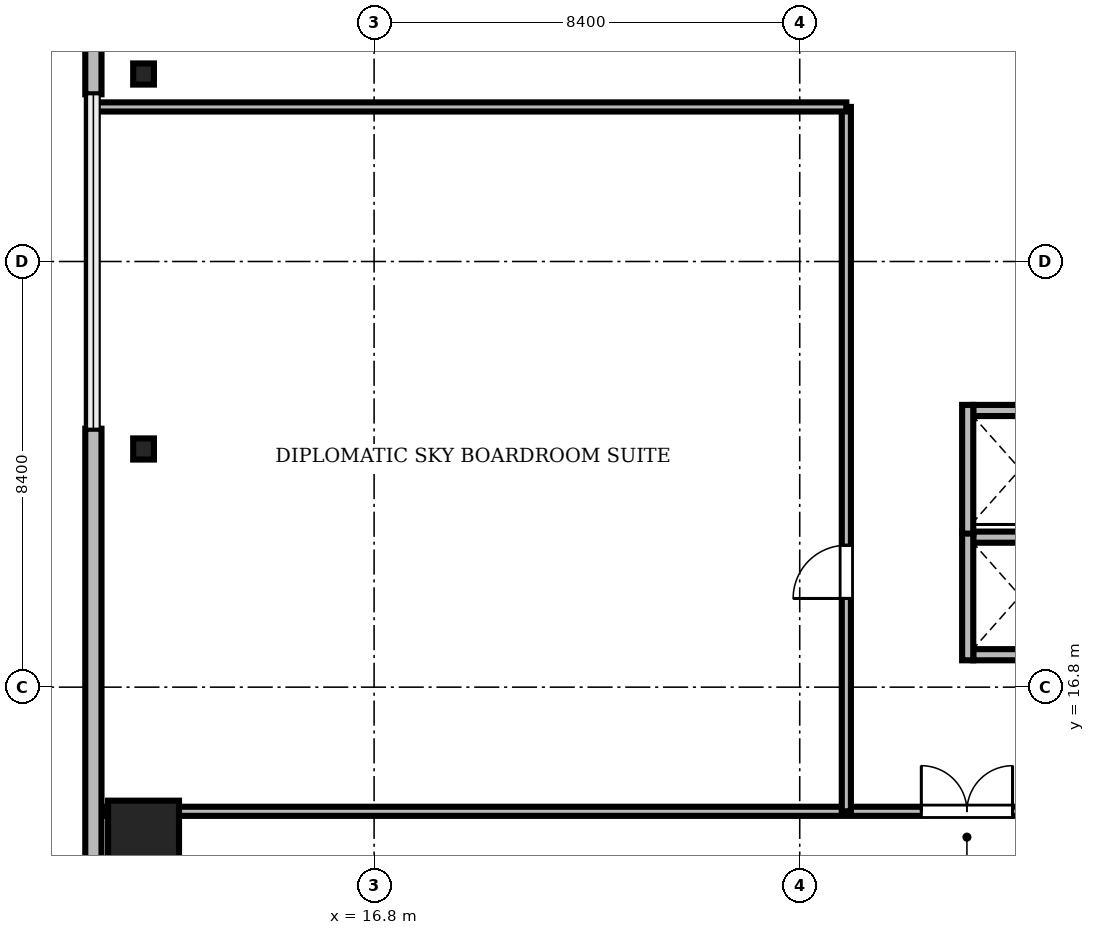
"""IFC4 building model, lengths in metres.
Left out: names, types, materials, properties, quantities, classifications, styles, units other than length and angle.
Written with IfcOpenShell. Run it as: python <this file> out.ifc"""

import sys

from ifc_helpers import new_model, si_unit, direction, frame, frame_2d, origin, origin_2d, place, context, subcontext, project, spatial, rectangle, i_section, extrude, source, transform, mapped, element, fill, save


model = new_model("IFC4")
c1 = context("Model", 3, precision=1e-05, world=origin(), true_north=direction((0.0, 1.0)))
c2 = subcontext(c1, "Body", "Model", "MODEL_VIEW")
j1 = project(units=[si_unit("LENGTHUNIT", "METRE"), si_unit("PLANEANGLEUNIT", "RADIAN")], contexts=[c1])
p1 = place(None, origin())
s1 = spatial("IfcSite", under=j1, at=p1, CompositionType="ELEMENT")
p2 = place(p1, origin())
s2 = spatial("IfcBuilding", under=s1, at=p2, CompositionType="ELEMENT")
p3 = place(p2, frame((0.0, 0.0, 172.2)))
s3 = spatial("IfcBuildingStorey", under=s2, at=p3, CompositionType="ELEMENT", Elevation=172.2)
m1 = source(origin(), c2, "Body", "SweptSolid", [
    extrude(rectangle(XDim=1.4, YDim=1.4, at=origin_2d()), origin(), (0.0, 0.0, 1.0), 4.78),
])
p4 = place(p3, frame((12.25, 13.86, 0.0), z_axis=(0.0, 0.0, 1.0), x_axis=(1.0, 0.0, 0.0)))
e1 = element("IfcColumn", 1, at=p4, inside=s3, PredefinedType="COLUMN", context=c2, shape_type="MappedRepresentation", body=[
    mapped(m1, transform((0.0, 0.0, 0.0), scale=1.0)),
])
m2 = source(origin(), c2, "Body", "SweptSolid", [
    extrude(i_section(OverallWidth=0.409, OverallDepth=0.417, WebThickness=0.021, FlangeThickness=0.033, FilletRadius=0.015, at=origin_2d()), origin(), (0.0, 0.0, 1.0), 4.78),
])
for number, where, z_axis, x_axis in (
    (2, (12.25, 28.9, 0.0), (0.0, 0.0, 1.0), (1.0, 0.0, 0.0)),
    (3, (12.25, 21.5, 0.0), (0.0, 0.0, 1.0), (1.0, 0.0, 0.0)),
):
    element("IfcColumn", number, at=place(p3, frame(where, z_axis=z_axis, x_axis=x_axis)), inside=s3, PredefinedType="COLUMN", context=c2, shape_type="MappedRepresentation", body=[
        mapped(m2, transform((0.0, 0.0, 0.0), scale=1.0)),
    ])
m3 = source(origin(), c2, "Body", "SweptSolid", [
    extrude(rectangle(XDim=15.6, YDim=0.32, at=frame_2d((7.8, 0.0))), origin(), (0.0, 0.0, 1.0), 4.78),
])
p5 = place(p3, frame((11.26, 44.1, 0.0), z_axis=(0.0, 0.0, 1.0), x_axis=(0.0, -1.0, 0.0)))
e4 = element("IfcWall", 4, at=p5, inside=s3, PredefinedType="SOLIDWALL", context=c2, shape_type="MappedRepresentation", body=[
    mapped(m3, transform((0.0, 0.0, 0.0), scale=1.0)),
])
m4 = source(origin(), c2, "Body", "SweptSolid", [
    extrude(rectangle(XDim=1.4, YDim=2.3, at=frame_2d((0.7, 1.15))), frame((0.0, 0.17, 0.0), z_axis=(0.0, -1.0, 0.0), x_axis=(1.0, 0.0, 0.0)), (0.0, 0.0, 1.0), 0.34),
])
p6 = place(p5, frame((9.61, 0.0, 0.0)))
e5 = element("IfcOpeningElement", 5, at=p6, cuts=e4, PredefinedType="OPENING", context=c2, shape_type="MappedRepresentation", body=[
    mapped(m4, transform((0.0, 0.0, 0.0), scale=1.0)),
])
m5 = source(origin(), c2, "Body", "SweptSolid", [
    extrude(rectangle(XDim=2.8, YDim=2.4, at=frame_2d((1.4, 1.2))), frame((0.0, 0.17, 0.0), z_axis=(0.0, -1.0, 0.0), x_axis=(1.0, 0.0, 0.0)), (0.0, 0.0, 1.0), 0.34),
])
p7 = place(p5, frame((2.705, 0.0, 0.72)))
e6 = element("IfcOpeningElement", 6, at=p7, cuts=e4, PredefinedType="OPENING", context=c2, shape_type="MappedRepresentation", body=[
    mapped(m5, transform((0.0, 0.0, 0.0), scale=1.0)),
])
m6 = source(origin(), c2, "Body", "SweptSolid", [
    extrude(rectangle(XDim=15.6, YDim=0.32, at=frame_2d((7.8, 0.0))), origin(), (0.0, 0.0, 1.0), 4.78),
])
p8 = place(p3, frame((11.26, 21.9, 0.0), z_axis=(0.0, 0.0, 1.0), x_axis=(0.0, -1.0, 0.0)))
e7 = element("IfcWall", 7, at=p8, inside=s3, PredefinedType="SOLIDWALL", context=c2, shape_type="MappedRepresentation", body=[
    mapped(m6, transform((0.0, 0.0, 0.0), scale=1.0)),
])
p9 = place(p8, frame((10.095, 0.0, 0.72)))
e8 = element("IfcOpeningElement", 8, at=p9, cuts=e7, PredefinedType="OPENING", context=c2, shape_type="MappedRepresentation", body=[
    mapped(m5, transform((0.0, 0.0, 0.0), scale=1.0)),
])
m7 = source(origin(), c2, "Body", "SweptSolid", [
    extrude(rectangle(XDim=1.85, YDim=0.22, at=frame_2d((0.925, 0.0))), origin(), (0.0, 0.0, 1.0), 4.222),
])
p10 = place(p3, frame((28.625, 17.44, 0.0), z_axis=(0.0, 0.0, 1.0), x_axis=(1.0, 0.0, 0.0)))
e9 = element("IfcWall", 9, at=p10, inside=s3, PredefinedType="SOLIDWALL", context=c2, shape_type="MappedRepresentation", body=[
    mapped(m7, transform((0.0, 0.0, 0.0), scale=1.0)),
])
m8 = source(origin(), c2, "Body", "SweptSolid", [
    extrude(rectangle(XDim=1.85, YDim=0.22, at=frame_2d((0.925, 0.0))), origin(), (0.0, 0.0, 1.0), 4.78),
])
p11 = place(p3, frame((28.625, 19.76, 0.0), z_axis=(0.0, 0.0, 1.0), x_axis=(1.0, 0.0, 0.0)))
e10 = element("IfcWall", 10, at=p11, inside=s3, PredefinedType="SOLIDWALL", context=c2, shape_type="MappedRepresentation", body=[
    mapped(m8, transform((0.0, 0.0, 0.0), scale=1.0)),
])
m9 = source(origin(), c2, "Body", "SweptSolid", [
    extrude(rectangle(XDim=2.54, YDim=0.22, at=frame_2d((1.27, 0.0))), origin(), (0.0, 0.0, 1.0), 4.222),
])
p12 = place(p3, frame((28.515, 17.33, 0.0), z_axis=(0.0, 0.0, 1.0), x_axis=(0.0, 1.0, 0.0)))
e11 = element("IfcWall", 11, at=p12, inside=s3, PredefinedType="SOLIDWALL", context=c2, shape_type="MappedRepresentation", body=[
    mapped(m9, transform((0.0, 0.0, 0.0), scale=1.0)),
])
p13 = place(p3, frame((28.625, 22.26, 0.0), z_axis=(0.0, 0.0, 1.0), x_axis=(1.0, 0.0, 0.0)))
e12 = element("IfcWall", 12, at=p13, inside=s3, PredefinedType="SOLIDWALL", context=c2, shape_type="MappedRepresentation", body=[
    mapped(m8, transform((0.0, 0.0, 0.0), scale=1.0)),
])
m10 = source(origin(), c2, "Body", "SweptSolid", [
    extrude(rectangle(XDim=2.54, YDim=0.22, at=frame_2d((1.27, 0.0))), origin(), (0.0, 0.0, 1.0), 4.78),
])
p14 = place(p3, frame((28.515, 19.83, 0.0), z_axis=(0.0, 0.0, 1.0), x_axis=(0.0, 1.0, 0.0)))
e13 = element("IfcWall", 13, at=p14, inside=s3, PredefinedType="SOLIDWALL", context=c2, shape_type="MappedRepresentation", body=[
    mapped(m10, transform((0.0, 0.0, 0.0), scale=1.0)),
])
m11 = source(origin(), c2, "Body", "SweptSolid", [
    extrude(rectangle(XDim=46.1, YDim=0.18, at=frame_2d((23.05, 0.0))), origin(), (0.0, 0.0, 1.0), 4.022),
])
p15 = place(p3, frame((11.45, 14.35, 0.0), z_axis=(0.0, 0.0, 1.0), x_axis=(1.0, 0.0, 0.0)))
e14 = element("IfcWall", 14, at=p15, inside=s3, PredefinedType="PARTITIONING", context=c2, shape_type="MappedRepresentation", body=[
    mapped(m11, transform((0.0, 0.0, 0.0), scale=1.0)),
])
m12 = source(origin(), c2, "Body", "SweptSolid", [
    extrude(rectangle(XDim=1.8, YDim=2.4, at=frame_2d((0.9, 1.2))), frame((0.0, 0.1, 0.0), z_axis=(0.0, -1.0, 0.0), x_axis=(1.0, 0.0, 0.0)), (0.0, 0.0, 1.0), 0.2),
])
p16 = place(p15, frame((16.15, 0.0, 0.0)))
e15 = element("IfcOpeningElement", 15, at=p16, cuts=e14, PredefinedType="OPENING", context=c2, shape_type="MappedRepresentation", body=[
    mapped(m12, transform((0.0, 0.0, 0.0), scale=1.0)),
])
p17 = place(p15, frame((30.75, 0.0, 0.0)))
e16 = element("IfcOpeningElement", 16, at=p17, cuts=e14, PredefinedType="OPENING", context=c2, shape_type="MappedRepresentation", body=[
    mapped(m12, transform((0.0, 0.0, 0.0), scale=1.0)),
])
m13 = source(origin(), c2, "Body", "SweptSolid", [
    extrude(rectangle(XDim=13.9, YDim=0.18, at=frame_2d((6.95, 0.0))), origin(), (0.0, 0.0, 1.0), 4.222),
])
p18 = place(p3, frame((26.12, 14.35, 0.0), z_axis=(0.0, 0.0, 1.0), x_axis=(0.0, 1.0, 0.0)))
e17 = element("IfcWall", 17, at=p18, inside=s3, PredefinedType="PARTITIONING", context=c2, shape_type="MappedRepresentation", body=[
    mapped(m13, transform((0.0, 0.0, 0.0), scale=1.0)),
])
m14 = source(origin(), c2, "Body", "SweptSolid", [
    extrude(rectangle(XDim=1.05, YDim=2.2, at=frame_2d((0.525, 1.1))), frame((0.0, 0.1, 0.0), z_axis=(0.0, -1.0, 0.0), x_axis=(1.0, 0.0, 0.0)), (0.0, 0.0, 1.0), 0.2),
])
p19 = place(p18, frame((4.2, 0.0, 0.0)))
e18 = element("IfcOpeningElement", 18, at=p19, cuts=e17, PredefinedType="OPENING", context=c2, shape_type="MappedRepresentation", body=[
    mapped(m14, transform((0.0, 0.0, 0.0), scale=1.0)),
])
m15 = source(origin(), c2, "Body", "SweptSolid", [
    extrude(rectangle(XDim=14.9, YDim=0.18, at=frame_2d((7.45, 0.0))), origin(), (0.0, 0.0, 1.0), 4.022),
])
p20 = place(p3, frame((11.22, 28.25, 0.0), z_axis=(0.0, 0.0, 1.0), x_axis=(1.0, 0.0, 0.0)))
e19 = element("IfcWall", 19, at=p20, inside=s3, PredefinedType="PARTITIONING", context=c2, shape_type="MappedRepresentation", body=[
    mapped(m15, transform((0.0, 0.0, 0.0), scale=1.0)),
])
m16 = source(origin(), c2, "Body", "SweptSolid", [
    extrude(rectangle(XDim=1.8, YDim=2.4, at=frame_2d((0.9, 1.2))), frame((0.0, 0.025, 0.0), z_axis=(0.0, -1.0, 0.0), x_axis=(1.0, 0.0, 0.0)), (0.0, 0.0, 1.0), 0.05),
])
p21 = place(p16, origin())
e20 = element("IfcDoor", 20, at=p21, inside=s3, OperationType="DOUBLE_DOOR_SINGLE_SWING", PredefinedType="DOOR", context=c2, shape_type="MappedRepresentation", body=[
    mapped(m16, transform((0.0, 0.0, 0.0), scale=1.0)),
])
fill(e15, e20)
m17 = source(origin(), c2, "Body", "SweptSolid", [
    extrude(rectangle(XDim=1.05, YDim=2.2, at=frame_2d((0.525, 1.1))), frame((0.0, 0.025, 0.0), z_axis=(0.0, -1.0, 0.0), x_axis=(1.0, 0.0, 0.0)), (0.0, 0.0, 1.0), 0.05),
])
p22 = place(p19, origin())
e21 = element("IfcDoor", 21, at=p22, inside=s3, OperationType="SINGLE_SWING_LEFT", PredefinedType="DOOR", context=c2, shape_type="MappedRepresentation", body=[
    mapped(m17, transform((0.0, 0.0, 0.0), scale=1.0)),
])
fill(e18, e21)
save(model, sys.argv[1])
